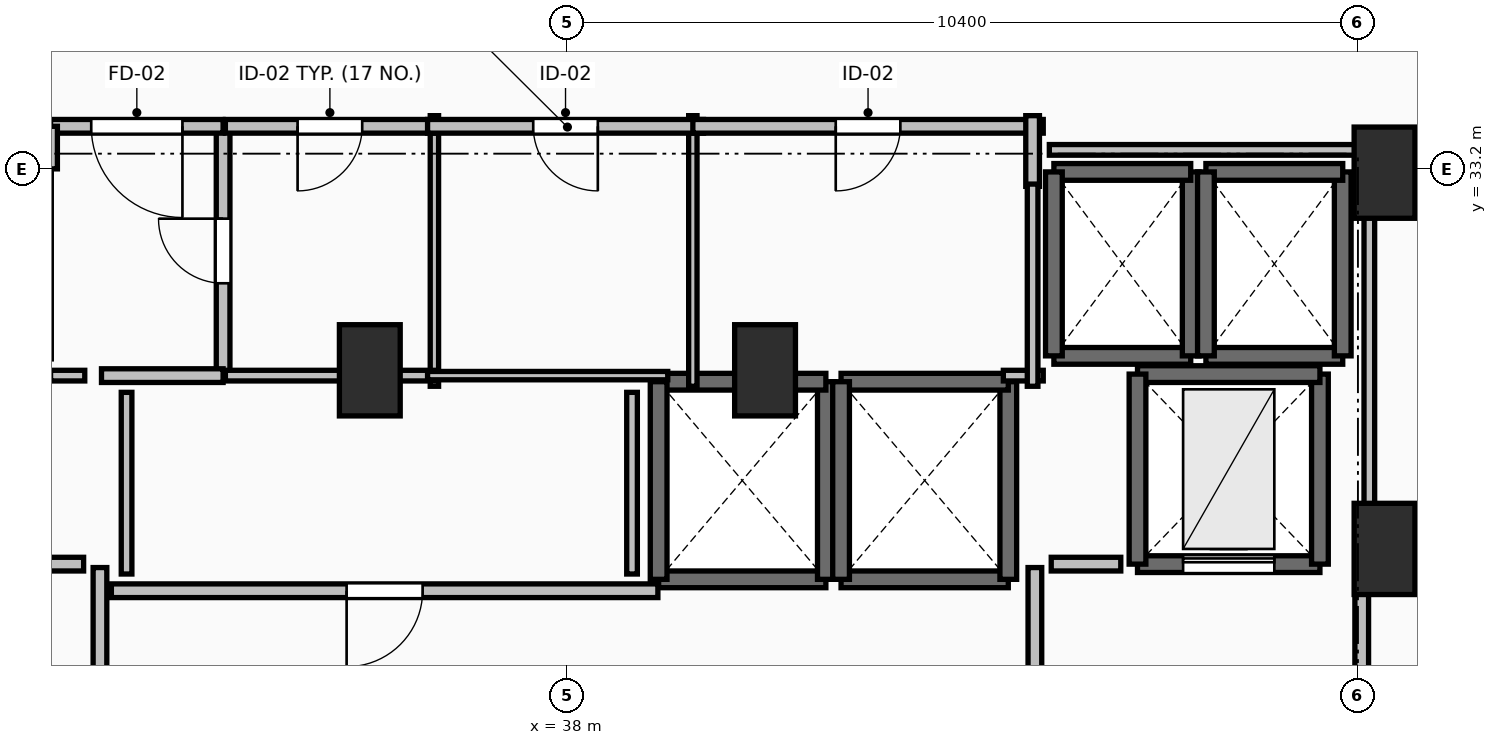
"""IFC4 building model, lengths in metres.
Left out: names, types, materials, properties, quantities, classifications, styles, units other than length and angle.
Written with IfcOpenShell. Run it as: python <this file> out.ifc"""

import sys

from ifc_helpers import new_model, si_unit, direction, frame, frame_2d, origin, origin_2d, place, context, subcontext, project, spatial, rectangle, extrude, element, fill, save


model = new_model("IFC4")
c1 = context("Model", 3, precision=1e-05, world=origin(), true_north=direction((0.0, 1.0)))
c2 = subcontext(c1, "Body", "Model", "MODEL_VIEW")
j1 = project(units=[si_unit("LENGTHUNIT", "METRE"), si_unit("PLANEANGLEUNIT", "RADIAN")], contexts=[c1])
p1 = place(None, origin())
s1 = spatial("IfcSite", under=j1, at=p1, CompositionType="ELEMENT")
p2 = place(p1, origin())
s2 = spatial("IfcBuilding", under=s1, at=p2, CompositionType="ELEMENT")
p3 = place(p2, frame((0.0, 0.0, 136.1)))
s3 = spatial("IfcBuildingStorey", under=s2, at=p3, CompositionType="ELEMENT", Elevation=136.1)
for number, where, z_axis, x_axis in (
    (1, (48.75, 33.15, 0.0), (0.0, 0.0, 1.0), (1.0, 0.0, 0.0)),
    (2, (48.75, 28.2, 0.0), (0.0, 0.0, 1.0), (1.0, 0.0, 0.0)),
    (3, (35.4, 30.55, 0.0), (0.0, 0.0, 1.0), (1.0, 0.0, 0.0)),
    (4, (40.6, 30.55, 0.0), (0.0, 0.0, 1.0), (1.0, 0.0, 0.0)),
):
    element("IfcColumn", number, at=place(p3, frame(where, z_axis=z_axis, x_axis=x_axis)), inside=s3, PredefinedType="PILASTER", context=c2, shape_type="SweptSolid", body=[
        extrude(rectangle(XDim=0.8, YDim=1.2, at=origin_2d()), origin(), (0.0, 0.0, 1.0), 3.5),
    ])
p4 = place(p3, frame((39.2, 27.8, 0.0), z_axis=(0.0, 0.0, 1.0), x_axis=(1.0, 0.0, 0.0)))
e5 = element("IfcWall", 5, at=p4, inside=s3, PredefinedType="SOLIDWALL", context=c2, shape_type="SweptSolid", body=[
    extrude(rectangle(XDim=2.2, YDim=0.22, at=frame_2d((1.1, 0.0))), origin(), (0.0, 0.0, 1.0), 3.24),
])
p5 = place(p3, frame((41.4, 27.8, 0.0), z_axis=(0.0, 0.0, 1.0), x_axis=(0.0, 1.0, 0.0)))
e6 = element("IfcWall", 6, at=p5, inside=s3, PredefinedType="SOLIDWALL", context=c2, shape_type="SweptSolid", body=[
    extrude(rectangle(XDim=2.6, YDim=0.22, at=frame_2d((1.3, 0.0))), origin(), (0.0, 0.0, 1.0), 3.24),
])
p6 = place(p3, frame((41.4, 30.4, 0.0), z_axis=(0.0, 0.0, 1.0), x_axis=(-1.0, 0.0, 0.0)))
e7 = element("IfcWall", 7, at=p6, inside=s3, PredefinedType="SOLIDWALL", context=c2, shape_type="SweptSolid", body=[
    extrude(rectangle(XDim=2.2, YDim=0.22, at=frame_2d((1.1, 0.0))), origin(), (0.0, 0.0, 1.0), 3.24),
])
p7 = place(p3, frame((39.2, 30.4, 0.0), z_axis=(0.0, 0.0, 1.0), x_axis=(0.0, -1.0, 0.0)))
e8 = element("IfcWall", 8, at=p7, inside=s3, PredefinedType="SOLIDWALL", context=c2, shape_type="SweptSolid", body=[
    extrude(rectangle(XDim=2.6, YDim=0.22, at=frame_2d((1.3, 0.0))), origin(), (0.0, 0.0, 1.0), 3.24),
])
p8 = place(p3, frame((41.6, 27.8, 0.0), z_axis=(0.0, 0.0, 1.0), x_axis=(1.0, 0.0, 0.0)))
e9 = element("IfcWall", 9, at=p8, inside=s3, PredefinedType="SOLIDWALL", context=c2, shape_type="SweptSolid", body=[
    extrude(rectangle(XDim=2.2, YDim=0.22, at=frame_2d((1.1, 0.0))), origin(), (0.0, 0.0, 1.0), 3.24),
])
p9 = place(p3, frame((43.8, 27.8, 0.0), z_axis=(0.0, 0.0, 1.0), x_axis=(0.0, 1.0, 0.0)))
e10 = element("IfcWall", 10, at=p9, inside=s3, PredefinedType="SOLIDWALL", context=c2, shape_type="SweptSolid", body=[
    extrude(rectangle(XDim=2.6, YDim=0.22, at=frame_2d((1.3, 0.0))), origin(), (0.0, 0.0, 1.0), 3.24),
])
p10 = place(p3, frame((43.8, 30.4, 0.0), z_axis=(0.0, 0.0, 1.0), x_axis=(-1.0, 0.0, 0.0)))
e11 = element("IfcWall", 11, at=p10, inside=s3, PredefinedType="SOLIDWALL", context=c2, shape_type="SweptSolid", body=[
    extrude(rectangle(XDim=2.2, YDim=0.22, at=frame_2d((1.1, 0.0))), origin(), (0.0, 0.0, 1.0), 3.24),
])
p11 = place(p3, frame((41.6, 30.4, 0.0), z_axis=(0.0, 0.0, 1.0), x_axis=(0.0, -1.0, 0.0)))
e12 = element("IfcWall", 12, at=p11, inside=s3, PredefinedType="SOLIDWALL", context=c2, shape_type="SweptSolid", body=[
    extrude(rectangle(XDim=2.6, YDim=0.22, at=frame_2d((1.3, 0.0))), origin(), (0.0, 0.0, 1.0), 3.24),
])
p12 = place(p3, frame((44.4, 30.74, 0.0), z_axis=(0.0, 0.0, 1.0), x_axis=(1.0, 0.0, 0.0)))
e13 = element("IfcWall", 13, at=p12, inside=s3, PredefinedType="SOLIDWALL", context=c2, shape_type="SweptSolid", body=[
    extrude(rectangle(XDim=1.8, YDim=0.22, at=frame_2d((0.9, 0.0))), origin(), (0.0, 0.0, 1.0), 3.24),
])
p13 = place(p3, frame((46.2, 30.74, 0.0), z_axis=(0.0, 0.0, 1.0), x_axis=(0.0, 1.0, 0.0)))
e14 = element("IfcWall", 14, at=p13, inside=s3, PredefinedType="SOLIDWALL", context=c2, shape_type="SweptSolid", body=[
    extrude(rectangle(XDim=2.42, YDim=0.22, at=frame_2d((1.21, 0.0))), origin(), (0.0, 0.0, 1.0), 3.24),
])
p14 = place(p3, frame((46.2, 33.16, 0.0), z_axis=(0.0, 0.0, 1.0), x_axis=(-1.0, 0.0, 0.0)))
e15 = element("IfcWall", 15, at=p14, inside=s3, PredefinedType="SOLIDWALL", context=c2, shape_type="SweptSolid", body=[
    extrude(rectangle(XDim=1.8, YDim=0.22, at=frame_2d((0.9, 0.0))), origin(), (0.0, 0.0, 1.0), 3.24),
])
p15 = place(p3, frame((44.4, 33.16, 0.0), z_axis=(0.0, 0.0, 1.0), x_axis=(0.0, -1.0, 0.0)))
e16 = element("IfcWall", 16, at=p15, inside=s3, PredefinedType="SOLIDWALL", context=c2, shape_type="SweptSolid", body=[
    extrude(rectangle(XDim=2.42, YDim=0.22, at=frame_2d((1.21, 0.0))), origin(), (0.0, 0.0, 1.0), 3.24),
])
p16 = place(p3, frame((46.4, 30.74, 0.0), z_axis=(0.0, 0.0, 1.0), x_axis=(1.0, 0.0, 0.0)))
e17 = element("IfcWall", 17, at=p16, inside=s3, PredefinedType="SOLIDWALL", context=c2, shape_type="SweptSolid", body=[
    extrude(rectangle(XDim=1.8, YDim=0.22, at=frame_2d((0.9, 0.0))), origin(), (0.0, 0.0, 1.0), 3.24),
])
p17 = place(p3, frame((48.2, 30.74, 0.0), z_axis=(0.0, 0.0, 1.0), x_axis=(0.0, 1.0, 0.0)))
e18 = element("IfcWall", 18, at=p17, inside=s3, PredefinedType="SOLIDWALL", context=c2, shape_type="SweptSolid", body=[
    extrude(rectangle(XDim=2.42, YDim=0.22, at=frame_2d((1.21, 0.0))), origin(), (0.0, 0.0, 1.0), 3.24),
])
p18 = place(p3, frame((48.2, 33.16, 0.0), z_axis=(0.0, 0.0, 1.0), x_axis=(-1.0, 0.0, 0.0)))
e19 = element("IfcWall", 19, at=p18, inside=s3, PredefinedType="SOLIDWALL", context=c2, shape_type="SweptSolid", body=[
    extrude(rectangle(XDim=1.8, YDim=0.22, at=frame_2d((0.9, 0.0))), origin(), (0.0, 0.0, 1.0), 3.24),
])
p19 = place(p3, frame((46.4, 33.16, 0.0), z_axis=(0.0, 0.0, 1.0), x_axis=(0.0, -1.0, 0.0)))
e20 = element("IfcWall", 20, at=p19, inside=s3, PredefinedType="SOLIDWALL", context=c2, shape_type="SweptSolid", body=[
    extrude(rectangle(XDim=2.42, YDim=0.22, at=frame_2d((1.21, 0.0))), origin(), (0.0, 0.0, 1.0), 3.24),
])
p20 = place(p3, frame((45.5, 28.0, 0.0), z_axis=(0.0, 0.0, 1.0), x_axis=(1.0, 0.0, 0.0)))
e21 = element("IfcWall", 21, at=p20, inside=s3, PredefinedType="SHEAR", context=c2, shape_type="SweptSolid", body=[
    extrude(rectangle(XDim=2.4, YDim=0.22, at=frame_2d((1.2, 0.0))), origin(), (0.0, 0.0, 1.0), 3.24),
])
p21 = place(p20, frame((0.6, 0.0, 0.0)))
e22 = element("IfcOpeningElement", 22, at=p21, cuts=e21, PredefinedType="OPENING", context=c2, shape_type="SweptSolid", body=[
    extrude(rectangle(XDim=1.2, YDim=2.2, at=frame_2d((0.6, 1.1))), frame((0.0, 0.125, 0.0), z_axis=(0.0, -1.0, 0.0), x_axis=(1.0, 0.0, 0.0)), (0.0, 0.0, 1.0), 0.25),
])
p22 = place(p3, frame((47.9, 28.0, 0.0), z_axis=(0.0, 0.0, 1.0), x_axis=(0.0, 1.0, 0.0)))
e23 = element("IfcWall", 23, at=p22, inside=s3, PredefinedType="SHEAR", context=c2, shape_type="SweptSolid", body=[
    extrude(rectangle(XDim=2.5, YDim=0.22, at=frame_2d((1.25, 0.0))), origin(), (0.0, 0.0, 1.0), 3.24),
])
p23 = place(p3, frame((47.9, 30.5, 0.0), z_axis=(0.0, 0.0, 1.0), x_axis=(-1.0, 0.0, 0.0)))
e24 = element("IfcWall", 24, at=p23, inside=s3, PredefinedType="SHEAR", context=c2, shape_type="SweptSolid", body=[
    extrude(rectangle(XDim=2.4, YDim=0.22, at=frame_2d((1.2, 0.0))), origin(), (0.0, 0.0, 1.0), 3.24),
])
p24 = place(p3, frame((45.5, 30.5, 0.0), z_axis=(0.0, 0.0, 1.0), x_axis=(0.0, -1.0, 0.0)))
e25 = element("IfcWall", 25, at=p24, inside=s3, PredefinedType="SHEAR", context=c2, shape_type="SweptSolid", body=[
    extrude(rectangle(XDim=2.5, YDim=0.22, at=frame_2d((1.25, 0.0))), origin(), (0.0, 0.0, 1.0), 3.24),
])
p25 = place(p3, frame((31.85, 24.045, 0.0), z_axis=(0.0, 0.0, 1.0), x_axis=(0.0, 1.0, 0.0)))
e26 = element("IfcWall", 26, at=p25, inside=s3, PredefinedType="PARTITIONING", context=c2, shape_type="SweptSolid", body=[
    extrude(rectangle(XDim=3.91, YDim=0.18, at=frame_2d((1.955, 0.0))), origin(), (0.0, 0.0, 1.0), 3.24),
])
p26 = place(p25, frame((1.355, 0.0, 0.0)))
e27 = element("IfcOpeningElement", 27, at=p26, cuts=e26, PredefinedType="OPENING", context=c2, shape_type="SweptSolid", body=[
    extrude(rectangle(XDim=1.2, YDim=2.15, at=frame_2d((0.6, 1.075))), frame((0.0, 0.105, 0.0), z_axis=(0.0, -1.0, 0.0), x_axis=(1.0, 0.0, 0.0)), (0.0, 0.0, 1.0), 0.21),
])
p27 = place(p3, frame((44.15, 27.955, 0.0), z_axis=(0.0, 0.0, 1.0), x_axis=(0.0, -1.0, 0.0)))
e28 = element("IfcWall", 28, at=p27, inside=s3, PredefinedType="PARTITIONING", context=c2, shape_type="SweptSolid", body=[
    extrude(rectangle(XDim=3.91, YDim=0.18, at=frame_2d((1.955, 0.0))), origin(), (0.0, 0.0, 1.0), 3.24),
])
p28 = place(p27, frame((1.355, 0.0, 0.0)))
e29 = element("IfcOpeningElement", 29, at=p28, cuts=e28, PredefinedType="OPENING", context=c2, shape_type="SweptSolid", body=[
    extrude(rectangle(XDim=1.2, YDim=2.15, at=frame_2d((0.6, 1.075))), frame((0.0, 0.105, 0.0), z_axis=(0.0, -1.0, 0.0), x_axis=(1.0, 0.0, 0.0)), (0.0, 0.0, 1.0), 0.21),
])
p29 = place(p3, frame((48.45, 23.95, 0.0), z_axis=(0.0, 0.0, 1.0), x_axis=(0.0, 1.0, 0.0)))
e30 = element("IfcWall", 30, at=p29, inside=s3, PredefinedType="PARTITIONING", context=c2, shape_type="SweptSolid", body=[
    extrude(rectangle(XDim=4.05, YDim=0.18, at=frame_2d((2.025, 0.0))), origin(), (0.0, 0.0, 1.0), 3.24),
])
p30 = place(p29, frame((1.425, 0.0, 0.0)))
e31 = element("IfcOpeningElement", 31, at=p30, cuts=e30, PredefinedType="OPENING", context=c2, shape_type="SweptSolid", body=[
    extrude(rectangle(XDim=1.2, YDim=2.15, at=frame_2d((0.6, 1.075))), frame((0.0, 0.105, 0.0), z_axis=(0.0, -1.0, 0.0), x_axis=(1.0, 0.0, 0.0)), (0.0, 0.0, 1.0), 0.21),
])
p31 = place(p3, frame((33.47, 30.48, 0.0), z_axis=(0.0, 0.0, 1.0), x_axis=(0.0, 1.0, 0.0)))
e32 = element("IfcWall", 32, at=p31, inside=s3, PredefinedType="PARTITIONING", context=c2, shape_type="SweptSolid", body=[
    extrude(rectangle(XDim=3.28, YDim=0.18, at=frame_2d((1.64, 0.0))), origin(), (0.0, 0.0, 1.0), 3.24),
])
p32 = place(p31, frame((1.215, 0.0, 0.0)))
e33 = element("IfcOpeningElement", 33, at=p32, cuts=e32, PredefinedType="OPENING", context=c2, shape_type="SweptSolid", body=[
    extrude(rectangle(XDim=0.85, YDim=2.1, at=frame_2d((0.425, 1.05))), frame((0.0, 0.105, 0.0), z_axis=(0.0, -1.0, 0.0), x_axis=(1.0, 0.0, 0.0)), (0.0, 0.0, 1.0), 0.21),
])
p33 = place(p3, frame((31.87, 30.48, 0.0), z_axis=(0.0, 0.0, 1.0), x_axis=(1.0, 0.0, 0.0)))
e34 = element("IfcWall", 34, at=p33, inside=s3, PredefinedType="PARTITIONING", context=c2, shape_type="SweptSolid", body=[
    extrude(rectangle(XDim=1.6, YDim=0.18, at=frame_2d((0.8, 0.0))), origin(), (0.0, 0.0, 1.0), 3.24),
])
p34 = place(p3, frame((33.47, 33.76, 0.0), z_axis=(0.0, 0.0, 1.0), x_axis=(-1.0, 0.0, 0.0)))
e35 = element("IfcWall", 35, at=p34, inside=s3, PredefinedType="PARTITIONING", context=c2, shape_type="SweptSolid", body=[
    extrude(rectangle(XDim=2.27, YDim=0.18, at=frame_2d((1.135, 0.0))), origin(), (0.0, 0.0, 1.0), 3.24),
])
p35 = place(p34, frame((0.535, 0.0, 0.0)))
e36 = element("IfcOpeningElement", 36, at=p35, cuts=e35, PredefinedType="OPENING", context=c2, shape_type="SweptSolid", body=[
    extrude(rectangle(XDim=1.2, YDim=2.15, at=frame_2d((0.6, 1.075))), frame((0.0, 0.105, 0.0), z_axis=(0.0, -1.0, 0.0), x_axis=(1.0, 0.0, 0.0)), (0.0, 0.0, 1.0), 0.21),
])
p36 = place(p3, frame((31.2, 33.76, 0.0), z_axis=(0.0, 0.0, 1.0), x_axis=(0.0, -1.0, 0.0)))
e37 = element("IfcWall", 37, at=p36, inside=s3, PredefinedType="PARTITIONING", context=c2, shape_type="SweptSolid", body=[
    extrude(rectangle(XDim=0.56, YDim=0.18, at=frame_2d((0.28, 0.0))), origin(), (0.0, 0.0, 1.0), 3.24),
])
p37 = place(p3, frame((39.19, 27.65, 0.0), z_axis=(0.0, 0.0, 1.0), x_axis=(-1.0, 0.0, 0.0)))
e38 = element("IfcWall", 38, at=p37, inside=s3, PredefinedType="PARTITIONING", context=c2, shape_type="SweptSolid", body=[
    extrude(rectangle(XDim=7.19, YDim=0.18, at=frame_2d((3.595, 0.0))), origin(), (0.0, 0.0, 1.0), 3.24),
])
p38 = place(p37, frame((3.095, 0.0, 0.0)))
e39 = element("IfcOpeningElement", 39, at=p38, cuts=e38, PredefinedType="OPENING", context=c2, shape_type="SweptSolid", body=[
    extrude(rectangle(XDim=1.0, YDim=2.15, at=frame_2d((0.5, 1.075))), frame((0.0, 0.105, 0.0), z_axis=(0.0, -1.0, 0.0), x_axis=(1.0, 0.0, 0.0)), (0.0, 0.0, 1.0), 0.21),
])
p39 = place(p3, frame((36.25, 30.34, 0.0), z_axis=(0.0, 0.0, 1.0), x_axis=(0.0, 1.0, 0.0)))
e40 = element("IfcWall", 40, at=p39, inside=s3, PredefinedType="PARTITIONING", context=c2, shape_type="SweptSolid", body=[
    extrude(rectangle(XDim=3.56, YDim=0.11, at=frame_2d((1.78, 0.0))), origin(), (0.0, 0.0, 1.0), 2.432),
])
p40 = place(p3, frame((33.5, 30.48, 0.0), z_axis=(0.0, 0.0, 1.0), x_axis=(1.0, 0.0, 0.0)))
e41 = element("IfcWall", 41, at=p40, inside=s3, PredefinedType="PARTITIONING", context=c2, shape_type="SweptSolid", body=[
    extrude(rectangle(XDim=2.75, YDim=0.14, at=frame_2d((1.375, 0.0))), origin(), (0.0, 0.0, 1.0), 2.432),
])
p41 = place(p3, frame((36.25, 33.76, 0.0), z_axis=(0.0, 0.0, 1.0), x_axis=(-1.0, 0.0, 0.0)))
e42 = element("IfcWall", 42, at=p41, inside=s3, PredefinedType="PARTITIONING", context=c2, shape_type="SweptSolid", body=[
    extrude(rectangle(XDim=2.75, YDim=0.18, at=frame_2d((1.375, 0.0))), origin(), (0.0, 0.0, 1.0), 3.24),
])
p42 = place(p41, frame((0.95, 0.0, 0.0)))
e43 = element("IfcOpeningElement", 43, at=p42, cuts=e42, PredefinedType="OPENING", context=c2, shape_type="SweptSolid", body=[
    extrude(rectangle(XDim=0.85, YDim=2.1, at=frame_2d((0.425, 1.05))), frame((0.0, 0.105, 0.0), z_axis=(0.0, -1.0, 0.0), x_axis=(1.0, 0.0, 0.0)), (0.0, 0.0, 1.0), 0.21),
])
p43 = place(p3, frame((39.65, 30.34, 0.0), z_axis=(0.0, 0.0, 1.0), x_axis=(0.0, 1.0, 0.0)))
e44 = element("IfcWall", 44, at=p43, inside=s3, PredefinedType="PARTITIONING", context=c2, shape_type="SweptSolid", body=[
    extrude(rectangle(XDim=3.56, YDim=0.11, at=frame_2d((1.78, 0.0))), origin(), (0.0, 0.0, 1.0), 2.432),
])
p44 = place(p3, frame((36.16, 30.48, 0.0), z_axis=(0.0, 0.0, 1.0), x_axis=(1.0, 0.0, 0.0)))
e45 = element("IfcWall", 45, at=p44, inside=s3, PredefinedType="PARTITIONING", context=c2, shape_type="SweptSolid", body=[
    extrude(rectangle(XDim=3.16, YDim=0.11, at=frame_2d((1.58, 0.0))), origin(), (0.0, 0.0, 1.0), 2.432),
])
p45 = place(p3, frame((39.79, 33.76, 0.0), z_axis=(0.0, 0.0, 1.0), x_axis=(-1.0, 0.0, 0.0)))
e46 = element("IfcWall", 46, at=p45, inside=s3, PredefinedType="PARTITIONING", context=c2, shape_type="SweptSolid", body=[
    extrude(rectangle(XDim=3.63, YDim=0.18, at=frame_2d((1.815, 0.0))), origin(), (0.0, 0.0, 1.0), 3.24),
])
p46 = place(p45, frame((1.39, 0.0, 0.0)))
e47 = element("IfcOpeningElement", 47, at=p46, cuts=e46, PredefinedType="OPENING", context=c2, shape_type="SweptSolid", body=[
    extrude(rectangle(XDim=0.85, YDim=2.1, at=frame_2d((0.425, 1.05))), frame((0.0, 0.105, 0.0), z_axis=(0.0, -1.0, 0.0), x_axis=(1.0, 0.0, 0.0)), (0.0, 0.0, 1.0), 0.21),
])
p47 = place(p3, frame((44.26, 33.76, 0.0), z_axis=(0.0, 0.0, 1.0), x_axis=(-1.0, 0.0, 0.0)))
e48 = element("IfcWall", 48, at=p47, inside=s3, PredefinedType="PARTITIONING", context=c2, shape_type="SweptSolid", body=[
    extrude(rectangle(XDim=4.61, YDim=0.18, at=frame_2d((2.305, 0.0))), origin(), (0.0, 0.0, 1.0), 3.24),
])
p48 = place(p47, frame((1.88, 0.0, 0.0)))
e49 = element("IfcOpeningElement", 49, at=p48, cuts=e48, PredefinedType="OPENING", context=c2, shape_type="SweptSolid", body=[
    extrude(rectangle(XDim=0.85, YDim=2.1, at=frame_2d((0.425, 1.05))), frame((0.0, 0.105, 0.0), z_axis=(0.0, -1.0, 0.0), x_axis=(1.0, 0.0, 0.0)), (0.0, 0.0, 1.0), 0.21),
])
p49 = place(p3, frame((44.12, 32.97, 0.0), z_axis=(0.0, 0.0, 1.0), x_axis=(0.0, 1.0, 0.0)))
e50 = element("IfcWall", 50, at=p49, inside=s3, PredefinedType="PARTITIONING", context=c2, shape_type="SweptSolid", body=[
    extrude(rectangle(XDim=0.93, YDim=0.18, at=frame_2d((0.465, 0.0))), origin(), (0.0, 0.0, 1.0), 3.24),
])
for number, where, z_axis, x_axis in (
    (51, (31.635, 28.0, 0.0), (0.0, 0.0, 1.0), (-1.0, 0.0, 0.0)),
    (52, (45.28, 28.0, 0.0), (0.0, 0.0, 1.0), (-1.0, 0.0, 0.0)),
):
    element("IfcWall", number, at=place(p3, frame(where, z_axis=z_axis, x_axis=x_axis)), inside=s3, PredefinedType="PARTITIONING", context=c2, shape_type="SweptSolid", body=[
        extrude(rectangle(XDim=0.915, YDim=0.18, at=frame_2d((0.458, 0.0))), origin(), (0.0, 0.0, 1.0), 3.24),
    ])
p50 = place(p3, frame((31.2, 30.48, 0.0), z_axis=(0.0, 0.0, 1.0), x_axis=(1.0, 0.0, 0.0)))
e53 = element("IfcWall", 53, at=p50, inside=s3, PredefinedType="PARTITIONING", context=c2, shape_type="SweptSolid", body=[
    extrude(rectangle(XDim=0.45, YDim=0.14, at=frame_2d((0.225, 0.0))), origin(), (0.0, 0.0, 1.0), 3.24),
])
p51 = place(p3, frame((43.735, 30.48, 0.0), z_axis=(0.0, 0.0, 1.0), x_axis=(1.0, 0.0, 0.0)))
e54 = element("IfcWall", 54, at=p51, inside=s3, PredefinedType="PARTITIONING", context=c2, shape_type="SweptSolid", body=[
    extrude(rectangle(XDim=0.525, YDim=0.14, at=frame_2d((0.262, 0.0))), origin(), (0.0, 0.0, 1.0), 3.24),
])
p52 = place(p3, frame((44.12, 30.34, 0.0), z_axis=(0.0, 0.0, 1.0), x_axis=(0.0, 1.0, 0.0)))
e55 = element("IfcWall", 55, at=p52, inside=s3, PredefinedType="PARTITIONING", context=c2, shape_type="SweptSolid", body=[
    extrude(rectangle(XDim=2.66, YDim=0.14, at=frame_2d((1.33, 0.0))), origin(), (0.0, 0.0, 1.0), 3.24),
])
for number, where, z_axis, x_axis in (
    (56, (32.2, 30.26, 0.0), (0.0, 0.0, 1.0), (0.0, -1.0, 0.0)),
    (57, (38.85, 27.87, 0.0), (0.0, 0.0, 1.0), (0.0, 1.0, 0.0)),
):
    element("IfcWall", number, at=place(p3, frame(where, z_axis=z_axis, x_axis=x_axis)), inside=s3, PredefinedType="PARTITIONING", context=c2, shape_type="SweptSolid", body=[
        extrude(rectangle(XDim=2.39, YDim=0.14, at=frame_2d((1.195, 0.0))), origin(), (0.0, 0.0, 1.0), 3.24),
    ])
p53 = place(p3, frame((48.55, 28.196, 0.0), z_axis=(0.0, 0.0, 1.0), x_axis=(0.0, 1.0, 0.0)))
e58 = element("IfcWall", 58, at=p53, inside=s3, PredefinedType="PARTITIONING", context=c2, shape_type="SweptSolid", body=[
    extrude(rectangle(XDim=5.254, YDim=0.14, at=frame_2d((2.627, 0.0))), origin(), (0.0, 0.0, 1.0), 2.432),
])
p54 = place(p3, frame((48.55, 33.45, 0.0), z_axis=(0.0, 0.0, 1.0), x_axis=(-1.0, 0.0, 0.0)))
e59 = element("IfcWall", 59, at=p54, inside=s3, PredefinedType="PARTITIONING", context=c2, shape_type="SweptSolid", body=[
    extrude(rectangle(XDim=4.21, YDim=0.14, at=frame_2d((2.105, 0.0))), origin(), (0.0, 0.0, 1.0), 2.432),
])
p55 = place(p21, origin())
e60 = element("IfcDoor", 60, at=p55, inside=s3, OperationType="SLIDING_TO_LEFT", PredefinedType="DOOR", context=c2, shape_type="SweptSolid", body=[
    extrude(rectangle(XDim=1.2, YDim=2.2, at=frame_2d((0.6, 1.1))), frame((0.0, 0.025, 0.0), z_axis=(0.0, -1.0, 0.0), x_axis=(1.0, 0.0, 0.0)), (0.0, 0.0, 1.0), 0.05),
])
fill(e22, e60)
p56 = place(p32, origin())
e61 = element("IfcDoor", 61, at=p56, inside=s3, OperationType="SINGLE_SWING_RIGHT", PredefinedType="DOOR", context=c2, shape_type="SweptSolid", body=[
    extrude(rectangle(XDim=0.85, YDim=2.1, at=frame_2d((0.425, 1.05))), frame((0.0, 0.025, 0.0), z_axis=(0.0, -1.0, 0.0), x_axis=(1.0, 0.0, 0.0)), (0.0, 0.0, 1.0), 0.05),
])
fill(e33, e61)
p57 = place(p35, origin())
e62 = element("IfcDoor", 62, at=p57, inside=s3, OperationType="SINGLE_SWING_LEFT", PredefinedType="DOOR", context=c2, shape_type="SweptSolid", body=[
    extrude(rectangle(XDim=1.2, YDim=2.15, at=frame_2d((0.6, 1.075))), frame((0.0, 0.025, 0.0), z_axis=(0.0, -1.0, 0.0), x_axis=(1.0, 0.0, 0.0)), (0.0, 0.0, 1.0), 0.05),
])
fill(e36, e62)
p58 = place(p38, origin())
e63 = element("IfcDoor", 63, at=p58, inside=s3, OperationType="SINGLE_SWING_RIGHT", PredefinedType="DOOR", context=c2, shape_type="SweptSolid", body=[
    extrude(rectangle(XDim=1.0, YDim=2.15, at=frame_2d((0.5, 1.075))), frame((0.0, 0.025, 0.0), z_axis=(0.0, -1.0, 0.0), x_axis=(1.0, 0.0, 0.0)), (0.0, 0.0, 1.0), 0.05),
])
fill(e39, e63)
p59 = place(p42, origin())
e64 = element("IfcDoor", 64, at=p59, inside=s3, OperationType="SINGLE_SWING_RIGHT", PredefinedType="DOOR", context=c2, shape_type="SweptSolid", body=[
    extrude(rectangle(XDim=0.85, YDim=2.1, at=frame_2d((0.425, 1.05))), frame((0.0, 0.025, 0.0), z_axis=(0.0, -1.0, 0.0), x_axis=(1.0, 0.0, 0.0)), (0.0, 0.0, 1.0), 0.05),
])
fill(e43, e64)
p60 = place(p46, origin())
e65 = element("IfcDoor", 65, at=p60, inside=s3, OperationType="SINGLE_SWING_LEFT", PredefinedType="DOOR", context=c2, shape_type="SweptSolid", body=[
    extrude(rectangle(XDim=0.85, YDim=2.1, at=frame_2d((0.425, 1.05))), frame((0.0, 0.025, 0.0), z_axis=(0.0, -1.0, 0.0), x_axis=(1.0, 0.0, 0.0)), (0.0, 0.0, 1.0), 0.05),
])
fill(e47, e65)
p61 = place(p48, origin())
e66 = element("IfcDoor", 66, at=p61, inside=s3, OperationType="SINGLE_SWING_RIGHT", PredefinedType="DOOR", context=c2, shape_type="SweptSolid", body=[
    extrude(rectangle(XDim=0.85, YDim=2.1, at=frame_2d((0.425, 1.05))), frame((0.0, 0.025, 0.0), z_axis=(0.0, -1.0, 0.0), x_axis=(1.0, 0.0, 0.0)), (0.0, 0.0, 1.0), 0.05),
])
fill(e49, e66)
save(model, sys.argv[1])
